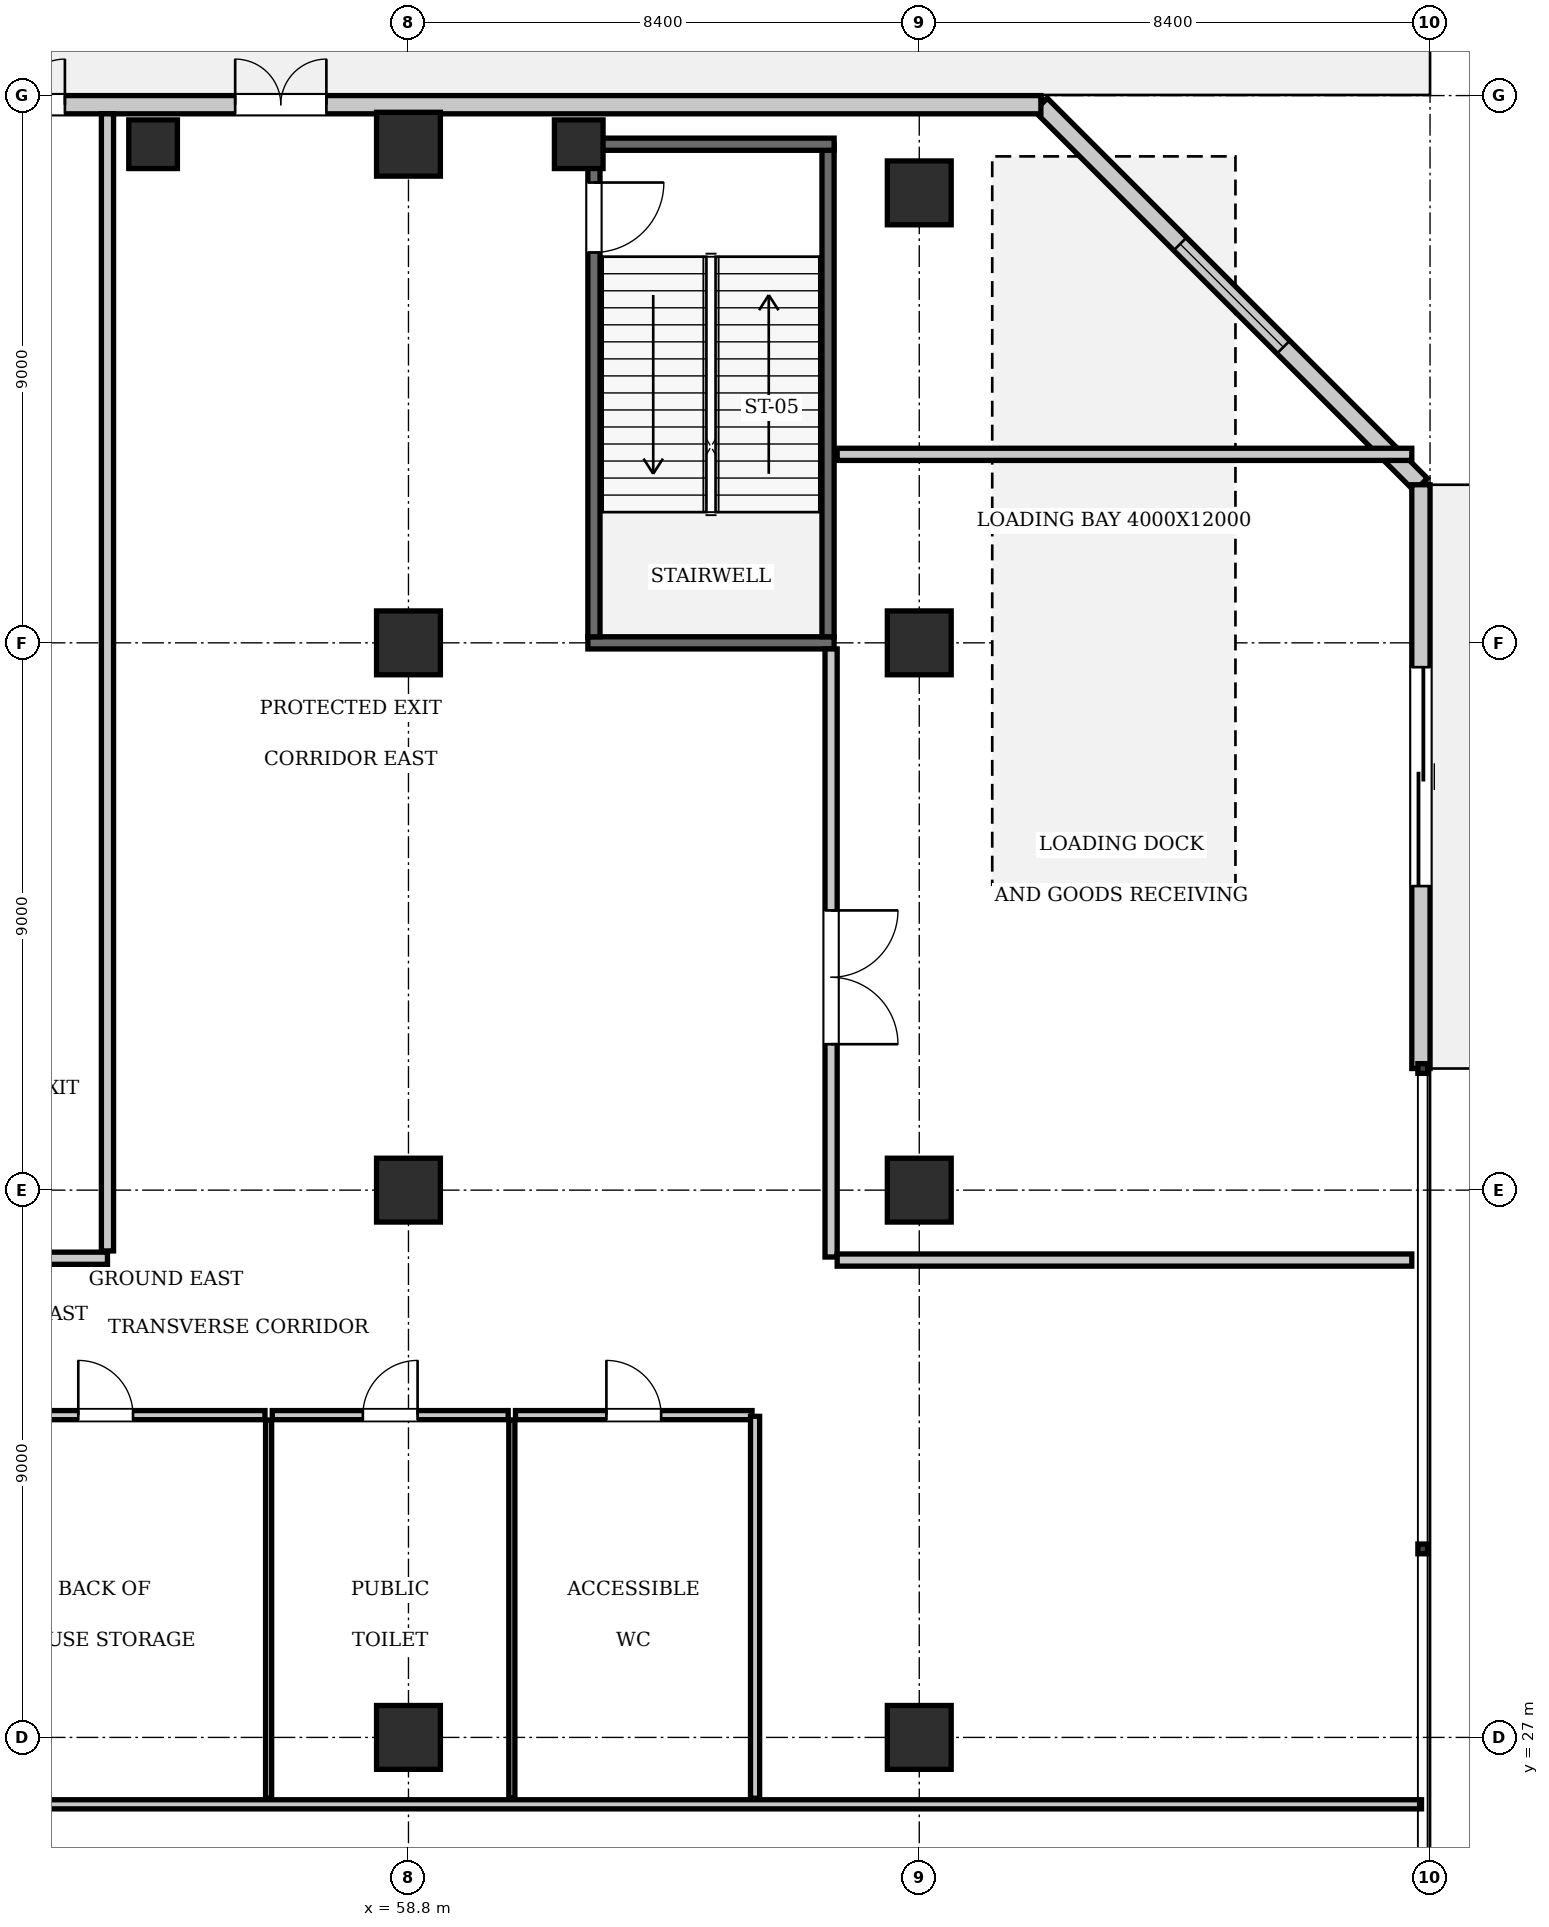
"""IFC4 building model, lengths in metres.
Left out: names, types, materials, properties, quantities, classifications, styles, units other than length and angle.
Written with IfcOpenShell. Run it as: python <this file> out.ifc"""

import sys

from ifc_helpers import new_model, si_unit, direction, frame, frame_2d, origin, origin_2d, place, context, subcontext, project, spatial, rectangle, extrude, element, fill, save


model = new_model("IFC4")
c1 = context("Model", 3, precision=1e-05, world=origin(), true_north=direction((0.0, 1.0)))
c2 = subcontext(c1, "Body", "Model", "MODEL_VIEW")
j1 = project(units=[si_unit("LENGTHUNIT", "METRE"), si_unit("PLANEANGLEUNIT", "RADIAN")], contexts=[c1])
p1 = place(None, origin())
s1 = spatial("IfcSite", under=j1, at=p1, CompositionType="ELEMENT")
p2 = place(p1, origin())
s2 = spatial("IfcBuilding", under=s1, at=p2, CompositionType="ELEMENT")
p3 = place(p2, origin())
s3 = spatial("IfcBuildingStorey", under=s2, at=p3, CompositionType="ELEMENT", Elevation=0.0)
for number, where, z_axis, x_axis in (
    (1, (58.8, 27.0, 0.0), (0.0, 0.0, 1.0), (1.0, 0.0, 0.0)),
    (2, (58.8, 36.0, 0.0), (0.0, 0.0, 1.0), (1.0, 0.0, 0.0)),
    (3, (58.8, 45.0, 0.0), (0.0, 0.0, 1.0), (1.0, 0.0, 0.0)),
    (4, (67.2, 27.0, 0.0), (0.0, 0.0, 1.0), (1.0, 0.0, 0.0)),
    (5, (67.2, 36.0, 0.0), (0.0, 0.0, 1.0), (1.0, 0.0, 0.0)),
    (6, (67.2, 45.0, 0.0), (0.0, 0.0, 1.0), (1.0, 0.0, 0.0)),
    (7, (67.2, 52.4, 0.0), (0.0, 0.0, 1.0), (1.0, 0.0, 0.0)),
    (8, (58.8, 53.2, 0.0), (0.0, 0.0, 1.0), (1.0, 0.0, 0.0)),
):
    element("IfcColumn", number, at=place(p3, frame(where, z_axis=z_axis, x_axis=x_axis)), inside=s3, PredefinedType="COLUMN", context=c2, shape_type="SweptSolid", body=[
        extrude(rectangle(XDim=1.05, YDim=1.05, at=origin_2d()), origin(), (0.0, 0.0, 1.0), 5.6),
    ])
for number, where, z_axis, x_axis in (
    (9, (54.6, 53.2, 0.0), (0.0, 0.0, 1.0), (1.0, 0.0, 0.0)),
    (10, (61.6, 53.2, 0.0), (0.0, 0.0, 1.0), (1.0, 0.0, 0.0)),
):
    element("IfcColumn", number, at=place(p3, frame(where, z_axis=z_axis, x_axis=x_axis)), inside=s3, PredefinedType="PILASTER", context=c2, shape_type="SweptSolid", body=[
        extrude(rectangle(XDim=0.8, YDim=0.8, at=origin_2d()), origin(), (0.0, 0.0, 1.0), 5.6),
    ])
p4 = place(p3, frame((61.75, 45.0, 0.0), z_axis=(0.0, 0.0, 1.0), x_axis=(1.0, 0.0, 0.0)))
e11 = element("IfcWall", 11, at=p4, inside=s3, PredefinedType="SOLIDWALL", context=c2, shape_type="SweptSolid", body=[
    extrude(rectangle(XDim=4.05, YDim=0.2, at=frame_2d((2.025, 0.0))), origin(), (0.0, 0.0, 1.0), 4.685),
])
p5 = place(p3, frame((61.85, 45.1, 0.0), z_axis=(0.0, 0.0, 1.0), x_axis=(0.0, 1.0, 0.0)))
e12 = element("IfcWall", 12, at=p5, inside=s3, PredefinedType="SOLIDWALL", context=c2, shape_type="SweptSolid", body=[
    extrude(rectangle(XDim=8.1, YDim=0.2, at=frame_2d((4.05, 0.0))), origin(), (0.0, 0.0, 1.0), 5.32),
])
p6 = place(p5, frame((6.32, 0.0, 0.0)))
e13 = element("IfcOpeningElement", 13, at=p6, cuts=e12, PredefinedType="OPENING", context=c2, shape_type="SweptSolid", body=[
    extrude(rectangle(XDim=1.15, YDim=2.15, at=frame_2d((0.575, 1.075))), frame((0.0, 0.11, 0.0), z_axis=(0.0, -1.0, 0.0), x_axis=(1.0, 0.0, 0.0)), (0.0, 0.0, 1.0), 0.22),
])
p7 = place(p3, frame((65.7, 45.1, 0.0), z_axis=(0.0, 0.0, 1.0), x_axis=(0.0, 1.0, 0.0)))
e14 = element("IfcWall", 14, at=p7, inside=s3, PredefinedType="SOLIDWALL", context=c2, shape_type="SweptSolid", body=[
    extrude(rectangle(XDim=8.1, YDim=0.2, at=frame_2d((4.05, 0.0))), origin(), (0.0, 0.0, 1.0), 5.32),
])
p8 = place(p3, frame((61.75, 53.2, 0.0), z_axis=(0.0, 0.0, 1.0), x_axis=(1.0, 0.0, 0.0)))
e15 = element("IfcWall", 15, at=p8, inside=s3, PredefinedType="SOLIDWALL", context=c2, shape_type="SweptSolid", body=[
    extrude(rectangle(XDim=4.05, YDim=0.2, at=frame_2d((2.025, 0.0))), origin(), (0.0, 0.0, 1.0), 5.32),
])
p9 = place(p3, frame((75.45, 47.6, 0.0), z_axis=(0.0, 0.0, 1.0), x_axis=(-0.707106781187, 0.707106781187, 0.0)))
e16 = element("IfcWall", 16, at=p9, inside=s3, PredefinedType="SOLIDWALL", context=c2, shape_type="SweptSolid", body=[
    extrude(rectangle(XDim=8.839, YDim=0.3, at=frame_2d((4.419, 0.0))), origin(), (0.0, 0.0, 1.0), 5.32),
])
p10 = place(p9, frame((3.2, 0.0, 0.9)))
e17 = element("IfcOpeningElement", 17, at=p10, cuts=e16, PredefinedType="OPENING", context=c2, shape_type="SweptSolid", body=[
    extrude(rectangle(XDim=2.4, YDim=2.6, at=frame_2d((1.2, 1.3))), frame((0.0, 0.16, 0.0), z_axis=(0.0, -1.0, 0.0), x_axis=(1.0, 0.0, 0.0)), (0.0, 0.0, 1.0), 0.32),
])
p11 = place(p3, frame((75.45, 47.6, 0.0), z_axis=(0.0, 0.0, 1.0), x_axis=(0.0, -1.0, 0.0)))
e18 = element("IfcWall", 18, at=p11, inside=s3, PredefinedType="SOLIDWALL", context=c2, shape_type="SweptSolid", body=[
    extrude(rectangle(XDim=9.6, YDim=0.3, at=frame_2d((4.8, 0.0))), origin(), (0.0, 0.0, 1.0), 5.32),
])
p12 = place(p11, frame((3.0, 0.0, 0.0)))
e19 = element("IfcOpeningElement", 19, at=p12, cuts=e18, PredefinedType="OPENING", context=c2, shape_type="SweptSolid", body=[
    extrude(rectangle(XDim=3.6, YDim=3.2, at=frame_2d((1.8, 1.6))), frame((0.0, 0.16, 0.0), z_axis=(0.0, -1.0, 0.0), x_axis=(1.0, 0.0, 0.0)), (0.0, 0.0, 1.0), 0.32),
])
p13 = place(p3, frame((50.4, 53.85, 0.0), z_axis=(0.0, 0.0, 1.0), x_axis=(1.0, 0.0, 0.0)))
e20 = element("IfcWall", 20, at=p13, inside=s3, PredefinedType="SOLIDWALL", context=c2, shape_type="SweptSolid", body=[
    extrude(rectangle(XDim=18.8, YDim=0.3, at=frame_2d((9.4, 0.0))), origin(), (0.0, 0.0, 1.0), 5.32),
])
p14 = place(p13, frame((1.25, 0.0, 0.0)))
e21 = element("IfcOpeningElement", 21, at=p14, cuts=e20, PredefinedType="OPENING", context=c2, shape_type="SweptSolid", body=[
    extrude(rectangle(XDim=1.5, YDim=2.2, at=frame_2d((0.75, 1.1))), frame((0.0, 0.16, 0.0), z_axis=(0.0, -1.0, 0.0), x_axis=(1.0, 0.0, 0.0)), (0.0, 0.0, 1.0), 0.32),
])
p15 = place(p13, frame((5.55, 0.0, 0.0)))
e22 = element("IfcOpeningElement", 22, at=p15, cuts=e20, PredefinedType="OPENING", context=c2, shape_type="SweptSolid", body=[
    extrude(rectangle(XDim=1.5, YDim=2.2, at=frame_2d((0.75, 1.1))), frame((0.0, 0.16, 0.0), z_axis=(0.0, -1.0, 0.0), x_axis=(1.0, 0.0, 0.0)), (0.0, 0.0, 1.0), 0.32),
])
p16 = place(p3, frame((43.65, 34.88, 0.0), z_axis=(0.0, 0.0, 1.0), x_axis=(1.0, 0.0, 0.0)))
e23 = element("IfcWall", 23, at=p16, inside=s3, PredefinedType="PARTITIONING", context=c2, shape_type="SweptSolid", body=[
    extrude(rectangle(XDim=10.2, YDim=0.2, at=frame_2d((5.1, 0.0))), origin(), (0.0, 0.0, 1.0), 5.32),
])
p17 = place(p16, frame((7.72, 0.0, 0.0)))
e24 = element("IfcOpeningElement", 24, at=p17, cuts=e23, PredefinedType="OPENING", context=c2, shape_type="SweptSolid", body=[
    extrude(rectangle(XDim=1.15, YDim=2.15, at=frame_2d((0.575, 1.075))), frame((0.0, 0.11, 0.0), z_axis=(0.0, -1.0, 0.0), x_axis=(1.0, 0.0, 0.0)), (0.0, 0.0, 1.0), 0.22),
])
p18 = place(p3, frame((53.85, 35.0, 0.0), z_axis=(0.0, 0.0, 1.0), x_axis=(0.0, 1.0, 0.0)))
e25 = element("IfcWall", 25, at=p18, inside=s3, PredefinedType="PARTITIONING", context=c2, shape_type="SweptSolid", body=[
    extrude(rectangle(XDim=18.7, YDim=0.2, at=frame_2d((9.35, 0.0))), origin(), (0.0, 0.0, 1.0), 5.32),
])
p19 = place(p3, frame((51.12, 25.9, 0.0), z_axis=(0.0, 0.0, 1.0), x_axis=(1.0, 0.0, 0.0)))
e26 = element("IfcWall", 26, at=p19, inside=s3, PredefinedType="PARTITIONING", context=c2, shape_type="SweptSolid", body=[
    extrude(rectangle(XDim=24.34, YDim=0.15, at=frame_2d((12.17, 0.0))), origin(), (0.0, 0.0, 1.0), 5.32),
])
p20 = place(p3, frame((51.2, 32.3, 0.0), z_axis=(0.0, 0.0, 1.0), x_axis=(1.0, 0.0, 0.0)))
e27 = element("IfcWall", 27, at=p20, inside=s3, PredefinedType="PARTITIONING", context=c2, shape_type="SweptSolid", body=[
    extrude(rectangle(XDim=5.24, YDim=0.15, at=frame_2d((2.62, 0.0))), origin(), (0.0, 0.0, 1.0), 5.32),
])
p21 = place(p20, frame((2.17, 0.0, 0.0)))
e28 = element("IfcOpeningElement", 28, at=p21, cuts=e27, PredefinedType="OPENING", context=c2, shape_type="SweptSolid", body=[
    extrude(rectangle(XDim=0.9, YDim=2.1, at=frame_2d((0.45, 1.05))), frame((0.0, 0.085, 0.0), z_axis=(0.0, -1.0, 0.0), x_axis=(1.0, 0.0, 0.0)), (0.0, 0.0, 1.0), 0.17),
])
p22 = place(p3, frame((56.56, 32.3, 0.0), z_axis=(0.0, 0.0, 1.0), x_axis=(1.0, 0.0, 0.0)))
e29 = element("IfcWall", 29, at=p22, inside=s3, PredefinedType="PARTITIONING", context=c2, shape_type="SweptSolid", body=[
    extrude(rectangle(XDim=3.88, YDim=0.15, at=frame_2d((1.94, 0.0))), origin(), (0.0, 0.0, 1.0), 5.32),
])
p23 = place(p22, frame((1.49, 0.0, 0.0)))
e30 = element("IfcOpeningElement", 30, at=p23, cuts=e29, PredefinedType="OPENING", context=c2, shape_type="SweptSolid", body=[
    extrude(rectangle(XDim=0.9, YDim=2.1, at=frame_2d((0.45, 1.05))), frame((0.0, 0.085, 0.0), z_axis=(0.0, -1.0, 0.0), x_axis=(1.0, 0.0, 0.0)), (0.0, 0.0, 1.0), 0.17),
])
p24 = place(p3, frame((60.56, 32.3, 0.0), z_axis=(0.0, 0.0, 1.0), x_axis=(1.0, 0.0, 0.0)))
e31 = element("IfcWall", 31, at=p24, inside=s3, PredefinedType="PARTITIONING", context=c2, shape_type="SweptSolid", body=[
    extrude(rectangle(XDim=3.89, YDim=0.15, at=frame_2d((1.945, 0.0))), origin(), (0.0, 0.0, 1.0), 5.32),
])
p25 = place(p24, frame((1.495, 0.0, 0.0)))
e32 = element("IfcOpeningElement", 32, at=p25, cuts=e31, PredefinedType="OPENING", context=c2, shape_type="SweptSolid", body=[
    extrude(rectangle(XDim=0.9, YDim=2.1, at=frame_2d((0.45, 1.05))), frame((0.0, 0.085, 0.0), z_axis=(0.0, -1.0, 0.0), x_axis=(1.0, 0.0, 0.0)), (0.0, 0.0, 1.0), 0.17),
])
for number, where, z_axis, x_axis in (
    (33, (56.5, 26.0, 0.0), (0.0, 0.0, 1.0), (0.0, 1.0, 0.0)),
    (34, (60.5, 26.0, 0.0), (0.0, 0.0, 1.0), (0.0, 1.0, 0.0)),
):
    element("IfcWall", number, at=place(p3, frame(where, z_axis=z_axis, x_axis=x_axis)), inside=s3, PredefinedType="PARTITIONING", context=c2, shape_type="SweptSolid", body=[
        extrude(rectangle(XDim=6.22, YDim=0.1, at=frame_2d((3.11, 0.0))), origin(), (0.0, 0.0, 1.0), 5.32),
    ])
p26 = place(p3, frame((64.5, 26.0, 0.0), z_axis=(0.0, 0.0, 1.0), x_axis=(0.0, 1.0, 0.0)))
e35 = element("IfcWall", 35, at=p26, inside=s3, PredefinedType="PARTITIONING", context=c2, shape_type="SweptSolid", body=[
    extrude(rectangle(XDim=6.28, YDim=0.15, at=frame_2d((3.14, 0.0))), origin(), (0.0, 0.0, 1.0), 5.32),
])
p27 = place(p3, frame((65.75, 34.9, 0.0), z_axis=(0.0, 0.0, 1.0), x_axis=(0.0, 1.0, 0.0)))
e36 = element("IfcWall", 36, at=p27, inside=s3, PredefinedType="PARTITIONING", context=c2, shape_type="SweptSolid", body=[
    extrude(rectangle(XDim=10.0, YDim=0.2, at=frame_2d((5.0, 0.0))), origin(), (0.0, 0.0, 1.0), 5.32),
])
p28 = place(p27, frame((3.5, 0.0, 0.0)))
e37 = element("IfcOpeningElement", 37, at=p28, cuts=e36, PredefinedType="OPENING", context=c2, shape_type="SweptSolid", body=[
    extrude(rectangle(XDim=2.2, YDim=2.4, at=frame_2d((1.1, 1.2))), frame((0.0, 0.11, 0.0), z_axis=(0.0, -1.0, 0.0), x_axis=(1.0, 0.0, 0.0)), (0.0, 0.0, 1.0), 0.22),
])
for number, where, z_axis, x_axis in (
    (38, (65.85, 48.1, 0.0), (0.0, 0.0, 1.0), (1.0, 0.0, 0.0)),
    (39, (65.85, 34.85, 0.0), (0.0, 0.0, 1.0), (1.0, 0.0, 0.0)),
):
    element("IfcWall", number, at=place(p3, frame(where, z_axis=z_axis, x_axis=x_axis)), inside=s3, PredefinedType="PARTITIONING", context=c2, shape_type="SweptSolid", body=[
        extrude(rectangle(XDim=9.45, YDim=0.2, at=frame_2d((4.725, 0.0))), origin(), (0.0, 0.0, 1.0), 5.32),
    ])
p29 = place(p6, frame((1.15, 0.0, 0.0), z_axis=(0.0, 0.0, 1.0), x_axis=(-1.0, 0.0, 0.0)))
e40 = element("IfcDoor", 40, at=p29, inside=s3, OperationType="SINGLE_SWING_LEFT", PredefinedType="DOOR", context=c2, shape_type="SweptSolid", body=[
    extrude(rectangle(XDim=1.15, YDim=2.15, at=frame_2d((0.575, 1.075))), frame((0.0, 0.025, 0.0), z_axis=(0.0, -1.0, 0.0), x_axis=(1.0, 0.0, 0.0)), (0.0, 0.0, 1.0), 0.05),
])
fill(e13, e40)
p30 = place(p10, origin())
e41 = element("IfcWindow", 41, at=p30, inside=s3, PartitioningType="SINGLE_PANEL", PredefinedType="WINDOW", context=c2, shape_type="SweptSolid", body=[
    extrude(rectangle(XDim=2.4, YDim=2.6, at=frame_2d((1.2, 1.3))), frame((0.0, 0.03, 0.0), z_axis=(0.0, -1.0, 0.0), x_axis=(1.0, 0.0, 0.0)), (0.0, 0.0, 1.0), 0.06),
])
fill(e17, e41)
p31 = place(p12, origin())
e42 = element("IfcDoor", 42, at=p31, inside=s3, OperationType="ROLLINGUP", PredefinedType="GATE", context=c2, shape_type="SweptSolid", body=[
    extrude(rectangle(XDim=3.6, YDim=3.2, at=frame_2d((1.8, 1.6))), frame((0.0, 0.025, 0.0), z_axis=(0.0, -1.0, 0.0), x_axis=(1.0, 0.0, 0.0)), (0.0, 0.0, 1.0), 0.05),
])
fill(e19, e42)
p32 = place(p14, origin())
e43 = element("IfcDoor", 43, at=p32, inside=s3, OperationType="DOUBLE_DOOR_SINGLE_SWING", PredefinedType="DOOR", context=c2, shape_type="SweptSolid", body=[
    extrude(rectangle(XDim=1.5, YDim=2.2, at=frame_2d((0.75, 1.1))), frame((0.0, 0.025, 0.0), z_axis=(0.0, -1.0, 0.0), x_axis=(1.0, 0.0, 0.0)), (0.0, 0.0, 1.0), 0.05),
])
fill(e21, e43)
p33 = place(p15, origin())
e44 = element("IfcDoor", 44, at=p33, inside=s3, OperationType="DOUBLE_DOOR_SINGLE_SWING", PredefinedType="DOOR", context=c2, shape_type="SweptSolid", body=[
    extrude(rectangle(XDim=1.5, YDim=2.2, at=frame_2d((0.75, 1.1))), frame((0.0, 0.025, 0.0), z_axis=(0.0, -1.0, 0.0), x_axis=(1.0, 0.0, 0.0)), (0.0, 0.0, 1.0), 0.05),
])
fill(e22, e44)
p34 = place(p21, origin())
e45 = element("IfcDoor", 45, at=p34, inside=s3, OperationType="SINGLE_SWING_LEFT", PredefinedType="DOOR", context=c2, shape_type="SweptSolid", body=[
    extrude(rectangle(XDim=0.9, YDim=2.1, at=frame_2d((0.45, 1.05))), frame((0.0, 0.025, 0.0), z_axis=(0.0, -1.0, 0.0), x_axis=(1.0, 0.0, 0.0)), (0.0, 0.0, 1.0), 0.05),
])
fill(e28, e45)
p35 = place(p23, origin())
e46 = element("IfcDoor", 46, at=p35, inside=s3, OperationType="SINGLE_SWING_RIGHT", PredefinedType="DOOR", context=c2, shape_type="SweptSolid", body=[
    extrude(rectangle(XDim=0.9, YDim=2.1, at=frame_2d((0.45, 1.05))), frame((0.0, 0.025, 0.0), z_axis=(0.0, -1.0, 0.0), x_axis=(1.0, 0.0, 0.0)), (0.0, 0.0, 1.0), 0.05),
])
fill(e30, e46)
p36 = place(p25, origin())
e47 = element("IfcDoor", 47, at=p36, inside=s3, OperationType="SINGLE_SWING_LEFT", PredefinedType="DOOR", context=c2, shape_type="SweptSolid", body=[
    extrude(rectangle(XDim=0.9, YDim=2.1, at=frame_2d((0.45, 1.05))), frame((0.0, 0.025, 0.0), z_axis=(0.0, -1.0, 0.0), x_axis=(1.0, 0.0, 0.0)), (0.0, 0.0, 1.0), 0.05),
])
fill(e32, e47)
p37 = place(p28, frame((2.2, 0.0, 0.0), z_axis=(0.0, 0.0, 1.0), x_axis=(-1.0, 0.0, 0.0)))
e48 = element("IfcDoor", 48, at=p37, inside=s3, OperationType="DOUBLE_DOOR_SINGLE_SWING", PredefinedType="GATE", context=c2, shape_type="SweptSolid", body=[
    extrude(rectangle(XDim=2.2, YDim=2.4, at=frame_2d((1.1, 1.2))), frame((0.0, 0.025, 0.0), z_axis=(0.0, -1.0, 0.0), x_axis=(1.0, 0.0, 0.0)), (0.0, 0.0, 1.0), 0.05),
])
fill(e37, e48)
save(model, sys.argv[1])
